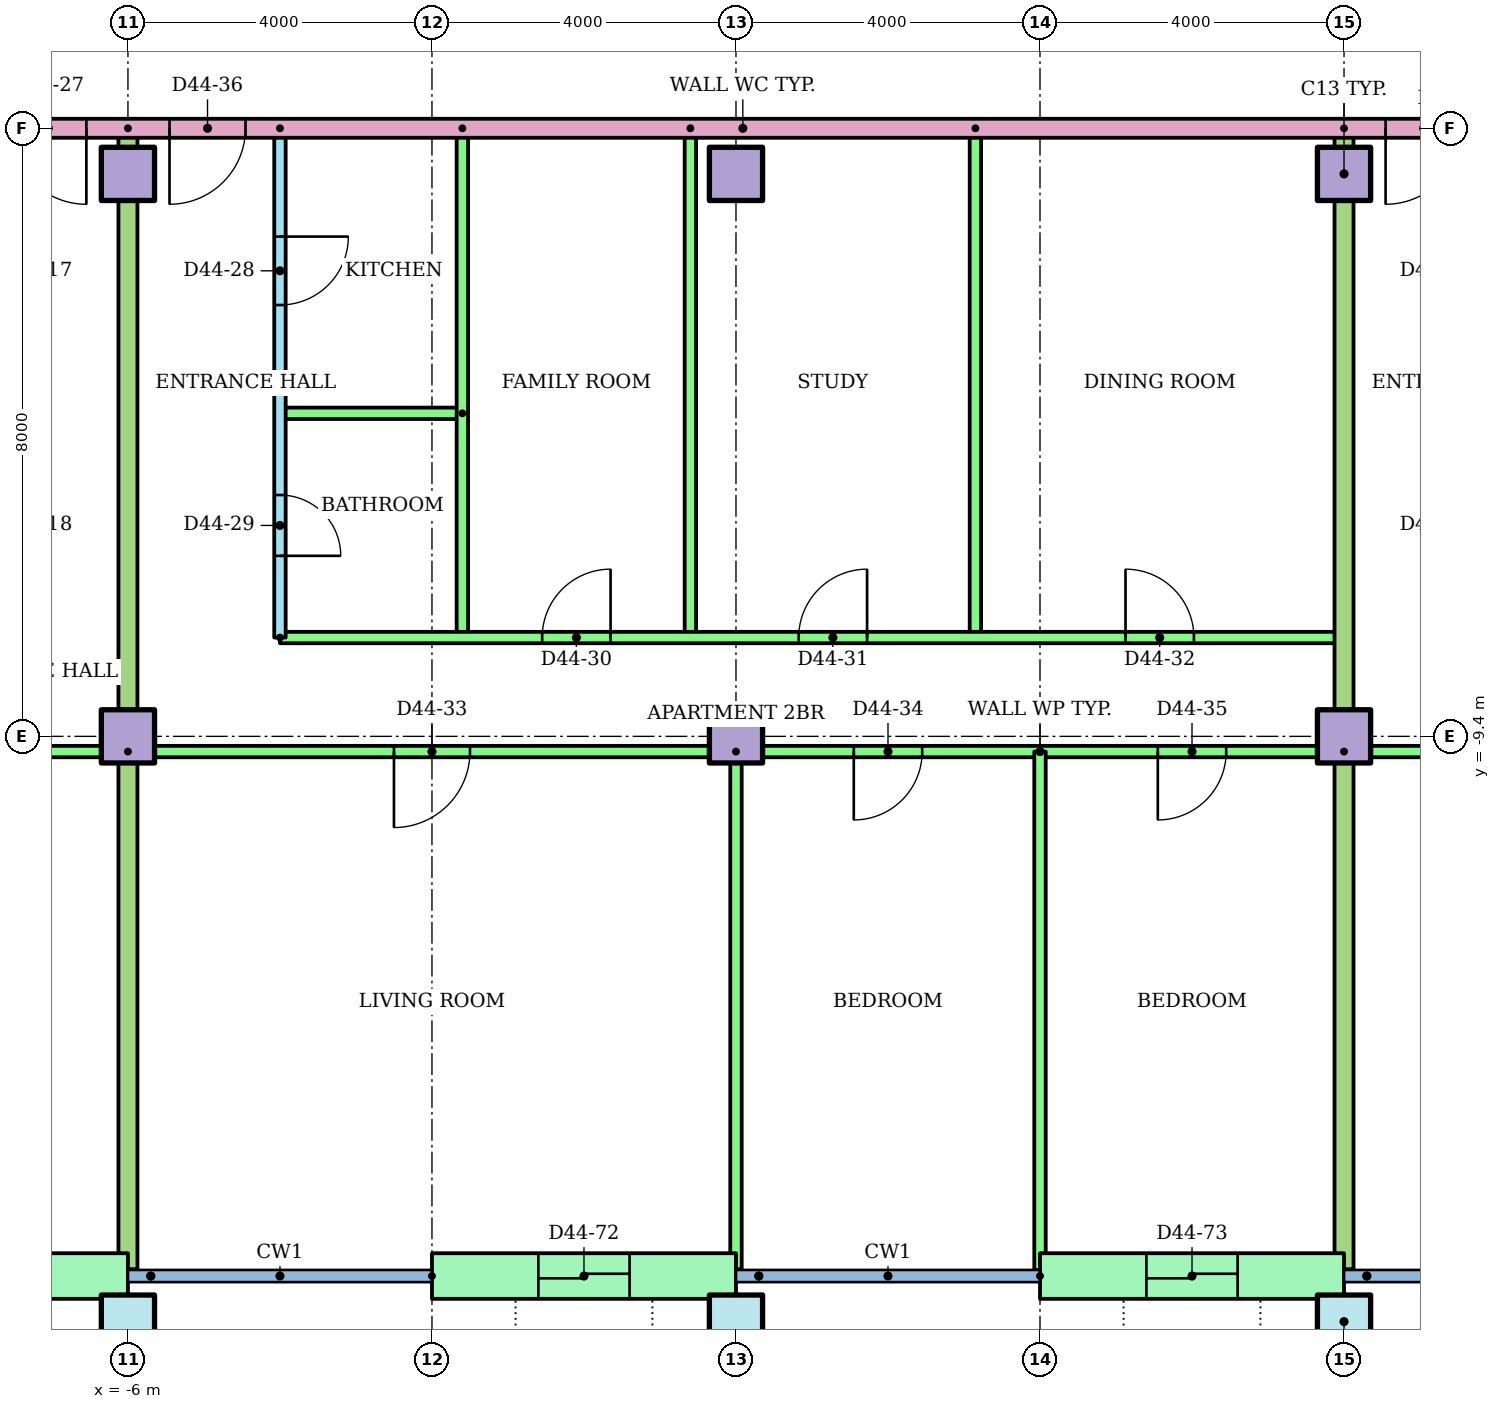
"""IFC4 building model, lengths in metres.
Left out: names, types, materials, properties, quantities, classifications, styles, units other than length and angle.
Written with IfcOpenShell. Run it as: python <this file> out.ifc"""

import sys

from ifc_helpers import new_model, si_unit, direction, frame, frame_2d, origin, origin_2d, place, context, subcontext, project, spatial, rectangle, hollow_rectangle, extrude, element, fill, save


model = new_model("IFC4")
c1 = context("Model", 3, precision=1e-05, world=origin(), true_north=direction((0.0, 1.0)))
c2 = subcontext(c1, "Body", "Model", "MODEL_VIEW")
j1 = project(units=[si_unit("LENGTHUNIT", "METRE"), si_unit("PLANEANGLEUNIT", "RADIAN")], contexts=[c1])
p1 = place(None, origin())
s1 = spatial("IfcSite", under=j1, at=p1, CompositionType="ELEMENT")
p2 = place(p1, origin())
s2 = spatial("IfcBuilding", under=s1, at=p2, CompositionType="ELEMENT")
p3 = place(p2, frame((0.0, 0.0, 171.7)))
s3 = spatial("IfcBuildingStorey", under=s2, at=p3, CompositionType="ELEMENT", Elevation=171.7)
for number, where in (
    (1, (-6.0, -17.1, 0.0)),
    (2, (2.0, -17.1, 0.0)),
    (3, (10.0, -17.1, 0.0)),
):
    element("IfcColumn", number, at=place(p3, frame(where)), inside=s3, PredefinedType="COLUMN", context=c2, shape_type="SweptSolid", body=[
        extrude(hollow_rectangle(XDim=0.7, YDim=0.7, WallThickness=0.036, at=origin_2d()), origin(), (0.0, 0.0, 1.0), 3.2),
    ])
for number, where in (
    (4, (-6.0, -9.4, 0.0)),
    (5, (2.0, -9.4, 0.0)),
    (6, (10.0, -9.4, 0.0)),
    (7, (-6.0, -2.0, 0.0)),
    (8, (2.0, -2.0, 0.0)),
    (9, (10.0, -2.0, 0.0)),
):
    element("IfcColumn", number, at=place(p3, frame(where)), inside=s3, PredefinedType="COLUMN", context=c2, shape_type="SweptSolid", body=[
        extrude(rectangle(XDim=0.7, YDim=0.7, at=origin_2d()), origin(), (0.0, 0.0, 1.0), 3.2),
    ])
p4 = place(p3, frame((-10.0, -16.5, 0.0)))
e10 = element("IfcWall", 10, at=p4, inside=s3, PredefinedType="STANDARD", context=c2, shape_type="SweptSolid", body=[
    extrude(rectangle(XDim=4.0, YDim=0.6, at=frame_2d((2.0, 0.0))), origin(), (0.0, 0.0, 1.0), 2.92),
])
p5 = place(p4, frame((1.4, 0.0, 0.0)))
e11 = element("IfcOpeningElement", 11, at=p5, cuts=e10, PredefinedType="OPENING", context=c2, shape_type="SweptSolid", body=[
    extrude(rectangle(XDim=1.2, YDim=2.1, at=frame_2d((0.6, 1.05))), frame((0.0, 0.31, 0.0), z_axis=(0.0, -1.0, 0.0), x_axis=(1.0, 0.0, 0.0)), (0.0, 0.0, 1.0), 0.62),
])
p6 = place(p3, frame((-2.0, -16.5, 0.0)))
e12 = element("IfcWall", 12, at=p6, inside=s3, PredefinedType="STANDARD", context=c2, shape_type="SweptSolid", body=[
    extrude(rectangle(XDim=4.0, YDim=0.6, at=frame_2d((2.0, 0.0))), origin(), (0.0, 0.0, 1.0), 2.92),
])
p7 = place(p6, frame((1.4, 0.0, 0.0)))
e13 = element("IfcOpeningElement", 13, at=p7, cuts=e12, PredefinedType="OPENING", context=c2, shape_type="SweptSolid", body=[
    extrude(rectangle(XDim=1.2, YDim=2.1, at=frame_2d((0.6, 1.05))), frame((0.0, 0.31, 0.0), z_axis=(0.0, -1.0, 0.0), x_axis=(1.0, 0.0, 0.0)), (0.0, 0.0, 1.0), 0.62),
])
p8 = place(p3, frame((6.0, -16.5, 0.0)))
e14 = element("IfcWall", 14, at=p8, inside=s3, PredefinedType="STANDARD", context=c2, shape_type="SweptSolid", body=[
    extrude(rectangle(XDim=4.0, YDim=0.6, at=frame_2d((2.0, 0.0))), origin(), (0.0, 0.0, 1.0), 2.92),
])
p9 = place(p8, frame((1.4, 0.0, 0.0)))
e15 = element("IfcOpeningElement", 15, at=p9, cuts=e14, PredefinedType="OPENING", context=c2, shape_type="SweptSolid", body=[
    extrude(rectangle(XDim=1.2, YDim=2.1, at=frame_2d((0.6, 1.05))), frame((0.0, 0.31, 0.0), z_axis=(0.0, -1.0, 0.0), x_axis=(1.0, 0.0, 0.0)), (0.0, 0.0, 1.0), 0.62),
])
p10 = place(p3, frame((-6.0, -9.6, 0.0), z_axis=(0.0, 0.0, 1.0), x_axis=(-1.0, 0.0, 0.0)))
e16 = element("IfcWall", 16, at=p10, inside=s3, PredefinedType="PARTITIONING", context=c2, shape_type="SweptSolid", body=[
    extrude(rectangle(XDim=18.82, YDim=0.15, at=frame_2d((9.41, 0.0))), origin(), (0.0, 0.0, 1.0), 2.4),
])
p11 = place(p10, frame((16.547, 0.0, 0.0)))
e17 = element("IfcOpeningElement", 17, at=p11, cuts=e16, PredefinedType="OPENING", context=c2, shape_type="SweptSolid", body=[
    extrude(rectangle(XDim=0.9, YDim=2.1, at=frame_2d((0.45, 1.05))), frame((0.0, 0.085, 0.0), z_axis=(0.0, -1.0, 0.0), x_axis=(1.0, 0.0, 0.0)), (0.0, 0.0, 1.0), 0.17),
])
p12 = place(p10, frame((10.45, 0.0, 0.0)))
e18 = element("IfcOpeningElement", 18, at=p12, cuts=e16, PredefinedType="OPENING", context=c2, shape_type="SweptSolid", body=[
    extrude(rectangle(XDim=0.9, YDim=2.1, at=frame_2d((0.45, 1.05))), frame((0.0, 0.085, 0.0), z_axis=(0.0, -1.0, 0.0), x_axis=(1.0, 0.0, 0.0)), (0.0, 0.0, 1.0), 0.17),
])
p13 = place(p10, frame((5.55, 0.0, 0.0)))
e19 = element("IfcOpeningElement", 19, at=p13, cuts=e16, PredefinedType="OPENING", context=c2, shape_type="SweptSolid", body=[
    extrude(rectangle(XDim=0.9, YDim=2.1, at=frame_2d((0.45, 1.05))), frame((0.0, 0.085, 0.0), z_axis=(0.0, -1.0, 0.0), x_axis=(1.0, 0.0, 0.0)), (0.0, 0.0, 1.0), 0.17),
])
p14 = place(p10, frame((1.5, 0.0, 0.0)))
e20 = element("IfcOpeningElement", 20, at=p14, cuts=e16, PredefinedType="OPENING", context=c2, shape_type="SweptSolid", body=[
    extrude(rectangle(XDim=1.0, YDim=2.1, at=frame_2d((0.5, 1.05))), frame((0.0, 0.085, 0.0), z_axis=(0.0, -1.0, 0.0), x_axis=(1.0, 0.0, 0.0)), (0.0, 0.0, 1.0), 0.17),
])
p15 = place(p3, frame((-4.0, -1.4, 0.0), z_axis=(0.0, 0.0, 1.0), x_axis=(0.0, -1.0, 0.0)))
e21 = element("IfcWall", 21, at=p15, inside=s3, PredefinedType="PARTITIONING", context=c2, shape_type="SweptSolid", body=[
    extrude(rectangle(XDim=6.7, YDim=0.15, at=frame_2d((3.35, 0.0))), origin(), (0.0, 0.0, 1.0), 2.4),
])
p16 = place(p15, frame((1.425, 0.0, 0.0)))
e22 = element("IfcOpeningElement", 22, at=p16, cuts=e21, PredefinedType="OPENING", context=c2, shape_type="SweptSolid", body=[
    extrude(rectangle(XDim=0.9, YDim=2.1, at=frame_2d((0.45, 1.05))), frame((0.0, 0.085, 0.0), z_axis=(0.0, -1.0, 0.0), x_axis=(1.0, 0.0, 0.0)), (0.0, 0.0, 1.0), 0.17),
])
p17 = place(p15, frame((4.825, 0.0, 0.0)))
e23 = element("IfcOpeningElement", 23, at=p17, cuts=e21, PredefinedType="OPENING", context=c2, shape_type="SweptSolid", body=[
    extrude(rectangle(XDim=0.8, YDim=2.1, at=frame_2d((0.4, 1.05))), frame((0.0, 0.085, 0.0), z_axis=(0.0, -1.0, 0.0), x_axis=(1.0, 0.0, 0.0)), (0.0, 0.0, 1.0), 0.17),
])
p18 = place(p3, frame((-1.6, -5.15, 0.0), z_axis=(0.0, 0.0, 1.0), x_axis=(-1.0, 0.0, 0.0)))
e24 = element("IfcWall", 24, at=p18, inside=s3, PredefinedType="PARTITIONING", context=c2, shape_type="SweptSolid", body=[
    extrude(rectangle(XDim=2.4, YDim=0.15, at=frame_2d((1.2, 0.0))), origin(), (0.0, 0.0, 1.0), 2.4),
])
for number, where, z_axis, x_axis in (
    (25, (-1.6, -1.4, 0.0), (0.0, 0.0, 1.0), (0.0, -1.0, 0.0)),
    (26, (1.4, -1.4, 0.0), (0.0, 0.0, 1.0), (0.0, -1.0, 0.0)),
    (27, (5.15, -1.4, 0.0), (0.0, 0.0, 1.0), (0.0, -1.0, 0.0)),
):
    element("IfcWall", number, at=place(p3, frame(where, z_axis=z_axis, x_axis=x_axis)), inside=s3, PredefinedType="PARTITIONING", context=c2, shape_type="SweptSolid", body=[
        extrude(rectangle(XDim=6.7, YDim=0.15, at=frame_2d((3.35, 0.0))), origin(), (0.0, 0.0, 1.0), 2.4),
    ])
p19 = place(p3, frame((-4.0, -8.1, 0.0)))
e28 = element("IfcWall", 28, at=p19, inside=s3, PredefinedType="PARTITIONING", context=c2, shape_type="SweptSolid", body=[
    extrude(rectangle(XDim=14.0, YDim=0.15, at=frame_2d((7.0, 0.0))), origin(), (0.0, 0.0, 1.0), 2.4),
])
p20 = place(p19, frame((3.45, 0.0, 0.0)))
e29 = element("IfcOpeningElement", 29, at=p20, cuts=e28, PredefinedType="OPENING", context=c2, shape_type="SweptSolid", body=[
    extrude(rectangle(XDim=0.9, YDim=2.1, at=frame_2d((0.45, 1.05))), frame((0.0, 0.085, 0.0), z_axis=(0.0, -1.0, 0.0), x_axis=(1.0, 0.0, 0.0)), (0.0, 0.0, 1.0), 0.17),
])
p21 = place(p19, frame((6.825, 0.0, 0.0)))
e30 = element("IfcOpeningElement", 30, at=p21, cuts=e28, PredefinedType="OPENING", context=c2, shape_type="SweptSolid", body=[
    extrude(rectangle(XDim=0.9, YDim=2.1, at=frame_2d((0.45, 1.05))), frame((0.0, 0.085, 0.0), z_axis=(0.0, -1.0, 0.0), x_axis=(1.0, 0.0, 0.0)), (0.0, 0.0, 1.0), 0.17),
])
p22 = place(p19, frame((11.125, 0.0, 0.0)))
e31 = element("IfcOpeningElement", 31, at=p22, cuts=e28, PredefinedType="OPENING", context=c2, shape_type="SweptSolid", body=[
    extrude(rectangle(XDim=0.9, YDim=2.1, at=frame_2d((0.45, 1.05))), frame((0.0, 0.085, 0.0), z_axis=(0.0, -1.0, 0.0), x_axis=(1.0, 0.0, 0.0)), (0.0, 0.0, 1.0), 0.17),
])
p23 = place(p3, frame((10.0, -9.6, 0.0), z_axis=(0.0, 0.0, 1.0), x_axis=(-1.0, 0.0, 0.0)))
e32 = element("IfcWall", 32, at=p23, inside=s3, PredefinedType="PARTITIONING", context=c2, shape_type="SweptSolid", body=[
    extrude(rectangle(XDim=16.0, YDim=0.15, at=frame_2d((8.0, 0.0))), origin(), (0.0, 0.0, 1.0), 2.4),
])
p24 = place(p23, frame((11.5, 0.0, 0.0)))
e33 = element("IfcOpeningElement", 33, at=p24, cuts=e32, PredefinedType="OPENING", context=c2, shape_type="SweptSolid", body=[
    extrude(rectangle(XDim=1.0, YDim=2.1, at=frame_2d((0.5, 1.05))), frame((0.0, 0.085, 0.0), z_axis=(0.0, -1.0, 0.0), x_axis=(1.0, 0.0, 0.0)), (0.0, 0.0, 1.0), 0.17),
])
p25 = place(p23, frame((5.55, 0.0, 0.0)))
e34 = element("IfcOpeningElement", 34, at=p25, cuts=e32, PredefinedType="OPENING", context=c2, shape_type="SweptSolid", body=[
    extrude(rectangle(XDim=0.9, YDim=2.1, at=frame_2d((0.45, 1.05))), frame((0.0, 0.085, 0.0), z_axis=(0.0, -1.0, 0.0), x_axis=(1.0, 0.0, 0.0)), (0.0, 0.0, 1.0), 0.17),
])
p26 = place(p23, frame((1.55, 0.0, 0.0)))
e35 = element("IfcOpeningElement", 35, at=p26, cuts=e32, PredefinedType="OPENING", context=c2, shape_type="SweptSolid", body=[
    extrude(rectangle(XDim=0.9, YDim=2.1, at=frame_2d((0.45, 1.05))), frame((0.0, 0.085, 0.0), z_axis=(0.0, -1.0, 0.0), x_axis=(1.0, 0.0, 0.0)), (0.0, 0.0, 1.0), 0.17),
])
p27 = place(p3, frame((2.0, -9.6, 0.0), z_axis=(0.0, 0.0, 1.0), x_axis=(0.0, -1.0, 0.0)))
e36 = element("IfcWall", 36, at=p27, inside=s3, PredefinedType="PARTITIONING", context=c2, shape_type="SweptSolid", body=[
    extrude(rectangle(XDim=6.81, YDim=0.15, at=frame_2d((3.405, 0.0))), origin(), (0.0, 0.0, 1.0), 2.4),
])
p28 = place(p3, frame((6.0, -9.6, 0.0), z_axis=(0.0, 0.0, 1.0), x_axis=(0.0, -1.0, 0.0)))
e37 = element("IfcWall", 37, at=p28, inside=s3, PredefinedType="PARTITIONING", context=c2, shape_type="SweptSolid", body=[
    extrude(rectangle(XDim=6.821, YDim=0.15, at=frame_2d((3.41, 0.0))), origin(), (0.0, 0.0, 1.0), 2.4),
])
p29 = place(p3, frame((-6.0, -1.4, 0.0), z_axis=(0.0, 0.0, 1.0), x_axis=(0.0, -1.0, 0.0)))
e38 = element("IfcWall", 38, at=p29, inside=s3, PredefinedType="PARTITIONING", context=c2, shape_type="SweptSolid", body=[
    extrude(rectangle(XDim=15.01, YDim=0.25, at=frame_2d((7.505, 0.0))), origin(), (0.0, 0.0, 1.0), 2.4),
])
p30 = place(p3, frame((36.82, -9.6, 0.0), z_axis=(0.0, 0.0, 1.0), x_axis=(-1.0, 0.0, 0.0)))
e39 = element("IfcWall", 39, at=p30, inside=s3, PredefinedType="PARTITIONING", context=c2, shape_type="SweptSolid", body=[
    extrude(rectangle(XDim=26.82, YDim=0.15, at=frame_2d((13.41, 0.0))), origin(), (0.0, 0.0, 1.0), 2.4),
])
p31 = place(p30, frame((24.37, 0.0, 0.0)))
e40 = element("IfcOpeningElement", 40, at=p31, cuts=e39, PredefinedType="OPENING", context=c2, shape_type="SweptSolid", body=[
    extrude(rectangle(XDim=0.9, YDim=2.1, at=frame_2d((0.45, 1.05))), frame((0.0, 0.085, 0.0), z_axis=(0.0, -1.0, 0.0), x_axis=(1.0, 0.0, 0.0)), (0.0, 0.0, 1.0), 0.17),
])
p32 = place(p30, frame((20.37, 0.0, 0.0)))
e41 = element("IfcOpeningElement", 41, at=p32, cuts=e39, PredefinedType="OPENING", context=c2, shape_type="SweptSolid", body=[
    extrude(rectangle(XDim=0.9, YDim=2.1, at=frame_2d((0.45, 1.05))), frame((0.0, 0.085, 0.0), z_axis=(0.0, -1.0, 0.0), x_axis=(1.0, 0.0, 0.0)), (0.0, 0.0, 1.0), 0.17),
])
p33 = place(p30, frame((16.37, 0.0, 0.0)))
e42 = element("IfcOpeningElement", 42, at=p33, cuts=e39, PredefinedType="OPENING", context=c2, shape_type="SweptSolid", body=[
    extrude(rectangle(XDim=0.9, YDim=2.1, at=frame_2d((0.45, 1.05))), frame((0.0, 0.085, 0.0), z_axis=(0.0, -1.0, 0.0), x_axis=(1.0, 0.0, 0.0)), (0.0, 0.0, 1.0), 0.17),
])
p34 = place(p30, frame((9.27, 0.0, 0.0)))
e43 = element("IfcOpeningElement", 43, at=p34, cuts=e39, PredefinedType="OPENING", context=c2, shape_type="SweptSolid", body=[
    extrude(rectangle(XDim=1.0, YDim=2.1, at=frame_2d((0.5, 1.05))), frame((0.0, 0.085, 0.0), z_axis=(0.0, -1.0, 0.0), x_axis=(1.0, 0.0, 0.0)), (0.0, 0.0, 1.0), 0.17),
])
p35 = place(p30, frame((1.373, 0.0, 0.0)))
e44 = element("IfcOpeningElement", 44, at=p35, cuts=e39, PredefinedType="OPENING", context=c2, shape_type="SweptSolid", body=[
    extrude(rectangle(XDim=0.9, YDim=2.1, at=frame_2d((0.45, 1.05))), frame((0.0, 0.085, 0.0), z_axis=(0.0, -1.0, 0.0), x_axis=(1.0, 0.0, 0.0)), (0.0, 0.0, 1.0), 0.17),
])
p36 = place(p3, frame((10.0, -1.4, 0.0), z_axis=(0.0, 0.0, 1.0), x_axis=(0.0, -1.0, 0.0)))
e45 = element("IfcWall", 45, at=p36, inside=s3, PredefinedType="PARTITIONING", context=c2, shape_type="SweptSolid", body=[
    extrude(rectangle(XDim=15.01, YDim=0.25, at=frame_2d((7.505, 0.0))), origin(), (0.0, 0.0, 1.0), 2.4),
])
p37 = place(p3, frame((14.0, -1.4, 0.0), z_axis=(0.0, 0.0, 1.0), x_axis=(-1.0, 0.0, 0.0)))
e46 = element("IfcWall", 46, at=p37, inside=s3, PredefinedType="PARTITIONING", context=c2, shape_type="SweptSolid", body=[
    extrude(rectangle(XDim=28.0, YDim=0.25, at=frame_2d((14.0, 0.0))), origin(), (0.0, 0.0, 1.0), 2.4),
])
p38 = place(p37, frame((20.547, 0.0, 0.0)))
e47 = element("IfcOpeningElement", 47, at=p38, cuts=e46, PredefinedType="OPENING", context=c2, shape_type="SweptSolid", body=[
    extrude(rectangle(XDim=1.0, YDim=2.1, at=frame_2d((0.5, 1.05))), frame((0.0, 0.135, 0.0), z_axis=(0.0, -1.0, 0.0), x_axis=(1.0, 0.0, 0.0)), (0.0, 0.0, 1.0), 0.27),
])
p39 = place(p37, frame((18.453, 0.0, 0.0)))
e48 = element("IfcOpeningElement", 48, at=p39, cuts=e46, PredefinedType="OPENING", context=c2, shape_type="SweptSolid", body=[
    extrude(rectangle(XDim=1.0, YDim=2.1, at=frame_2d((0.5, 1.05))), frame((0.0, 0.135, 0.0), z_axis=(0.0, -1.0, 0.0), x_axis=(1.0, 0.0, 0.0)), (0.0, 0.0, 1.0), 0.27),
])
p40 = place(p37, frame((2.453, 0.0, 0.0)))
e49 = element("IfcOpeningElement", 49, at=p40, cuts=e46, PredefinedType="OPENING", context=c2, shape_type="SweptSolid", body=[
    extrude(rectangle(XDim=1.0, YDim=2.1, at=frame_2d((0.5, 1.05))), frame((0.0, 0.135, 0.0), z_axis=(0.0, -1.0, 0.0), x_axis=(1.0, 0.0, 0.0)), (0.0, 0.0, 1.0), 0.27),
])
p41 = place(p38, origin())
e50 = element("IfcDoor", 50, at=p41, inside=s3, OperationType="SINGLE_SWING_LEFT", PredefinedType="DOOR", context=c2, shape_type="SweptSolid", body=[
    extrude(rectangle(XDim=1.0, YDim=2.1, at=frame_2d((0.5, 1.05))), frame((0.0, 0.025, 0.0), z_axis=(0.0, -1.0, 0.0), x_axis=(1.0, 0.0, 0.0)), (0.0, 0.0, 1.0), 0.05),
])
fill(e47, e50)
p42 = place(p16, origin())
e51 = element("IfcDoor", 51, at=p42, inside=s3, OperationType="SINGLE_SWING_LEFT", PredefinedType="DOOR", context=c2, shape_type="SweptSolid", body=[
    extrude(rectangle(XDim=0.9, YDim=2.1, at=frame_2d((0.45, 1.05))), frame((0.0, 0.025, 0.0), z_axis=(0.0, -1.0, 0.0), x_axis=(1.0, 0.0, 0.0)), (0.0, 0.0, 1.0), 0.05),
])
fill(e22, e51)
p43 = place(p17, origin())
e52 = element("IfcDoor", 52, at=p43, inside=s3, OperationType="SINGLE_SWING_RIGHT", PredefinedType="DOOR", context=c2, shape_type="SweptSolid", body=[
    extrude(rectangle(XDim=0.8, YDim=2.1, at=frame_2d((0.4, 1.05))), frame((0.0, 0.025, 0.0), z_axis=(0.0, -1.0, 0.0), x_axis=(1.0, 0.0, 0.0)), (0.0, 0.0, 1.0), 0.05),
])
fill(e23, e52)
p44 = place(p20, origin())
e53 = element("IfcDoor", 53, at=p44, inside=s3, OperationType="SINGLE_SWING_RIGHT", PredefinedType="DOOR", context=c2, shape_type="SweptSolid", body=[
    extrude(rectangle(XDim=0.9, YDim=2.1, at=frame_2d((0.45, 1.05))), frame((0.0, 0.025, 0.0), z_axis=(0.0, -1.0, 0.0), x_axis=(1.0, 0.0, 0.0)), (0.0, 0.0, 1.0), 0.05),
])
fill(e29, e53)
p45 = place(p21, origin())
e54 = element("IfcDoor", 54, at=p45, inside=s3, OperationType="SINGLE_SWING_RIGHT", PredefinedType="DOOR", context=c2, shape_type="SweptSolid", body=[
    extrude(rectangle(XDim=0.9, YDim=2.1, at=frame_2d((0.45, 1.05))), frame((0.0, 0.025, 0.0), z_axis=(0.0, -1.0, 0.0), x_axis=(1.0, 0.0, 0.0)), (0.0, 0.0, 1.0), 0.05),
])
fill(e30, e54)
p46 = place(p22, origin())
e55 = element("IfcDoor", 55, at=p46, inside=s3, OperationType="SINGLE_SWING_LEFT", PredefinedType="DOOR", context=c2, shape_type="SweptSolid", body=[
    extrude(rectangle(XDim=0.9, YDim=2.1, at=frame_2d((0.45, 1.05))), frame((0.0, 0.025, 0.0), z_axis=(0.0, -1.0, 0.0), x_axis=(1.0, 0.0, 0.0)), (0.0, 0.0, 1.0), 0.05),
])
fill(e31, e55)
p47 = place(p24, origin())
e56 = element("IfcDoor", 56, at=p47, inside=s3, OperationType="SINGLE_SWING_RIGHT", PredefinedType="DOOR", context=c2, shape_type="SweptSolid", body=[
    extrude(rectangle(XDim=1.0, YDim=2.1, at=frame_2d((0.5, 1.05))), frame((0.0, 0.025, 0.0), z_axis=(0.0, -1.0, 0.0), x_axis=(1.0, 0.0, 0.0)), (0.0, 0.0, 1.0), 0.05),
])
fill(e33, e56)
p48 = place(p25, origin())
e57 = element("IfcDoor", 57, at=p48, inside=s3, OperationType="SINGLE_SWING_RIGHT", PredefinedType="DOOR", context=c2, shape_type="SweptSolid", body=[
    extrude(rectangle(XDim=0.9, YDim=2.1, at=frame_2d((0.45, 1.05))), frame((0.0, 0.025, 0.0), z_axis=(0.0, -1.0, 0.0), x_axis=(1.0, 0.0, 0.0)), (0.0, 0.0, 1.0), 0.05),
])
fill(e34, e57)
p49 = place(p26, origin())
e58 = element("IfcDoor", 58, at=p49, inside=s3, OperationType="SINGLE_SWING_RIGHT", PredefinedType="DOOR", context=c2, shape_type="SweptSolid", body=[
    extrude(rectangle(XDim=0.9, YDim=2.1, at=frame_2d((0.45, 1.05))), frame((0.0, 0.025, 0.0), z_axis=(0.0, -1.0, 0.0), x_axis=(1.0, 0.0, 0.0)), (0.0, 0.0, 1.0), 0.05),
])
fill(e35, e58)
p50 = place(p39, origin())
e59 = element("IfcDoor", 59, at=p50, inside=s3, OperationType="SINGLE_SWING_RIGHT", PredefinedType="DOOR", context=c2, shape_type="SweptSolid", body=[
    extrude(rectangle(XDim=1.0, YDim=2.1, at=frame_2d((0.5, 1.05))), frame((0.0, 0.025, 0.0), z_axis=(0.0, -1.0, 0.0), x_axis=(1.0, 0.0, 0.0)), (0.0, 0.0, 1.0), 0.05),
])
fill(e48, e59)
p51 = place(p40, origin())
e60 = element("IfcDoor", 60, at=p51, inside=s3, OperationType="SINGLE_SWING_RIGHT", PredefinedType="DOOR", context=c2, shape_type="SweptSolid", body=[
    extrude(rectangle(XDim=1.0, YDim=2.1, at=frame_2d((0.5, 1.05))), frame((0.0, 0.025, 0.0), z_axis=(0.0, -1.0, 0.0), x_axis=(1.0, 0.0, 0.0)), (0.0, 0.0, 1.0), 0.05),
])
fill(e49, e60)
p52 = place(p7, origin())
e61 = element("IfcDoor", 61, at=p52, inside=s3, OperationType="SLIDING_TO_LEFT", PredefinedType="DOOR", context=c2, shape_type="SweptSolid", body=[
    extrude(rectangle(XDim=1.2, YDim=2.1, at=frame_2d((0.6, 1.05))), frame((0.0, 0.025, 0.0), z_axis=(0.0, -1.0, 0.0), x_axis=(1.0, 0.0, 0.0)), (0.0, 0.0, 1.0), 0.05),
])
fill(e13, e61)
p53 = place(p9, origin())
e62 = element("IfcDoor", 62, at=p53, inside=s3, OperationType="SLIDING_TO_LEFT", PredefinedType="DOOR", context=c2, shape_type="SweptSolid", body=[
    extrude(rectangle(XDim=1.2, YDim=2.1, at=frame_2d((0.6, 1.05))), frame((0.0, 0.025, 0.0), z_axis=(0.0, -1.0, 0.0), x_axis=(1.0, 0.0, 0.0)), (0.0, 0.0, 1.0), 0.05),
])
fill(e15, e62)
save(model, sys.argv[1])
